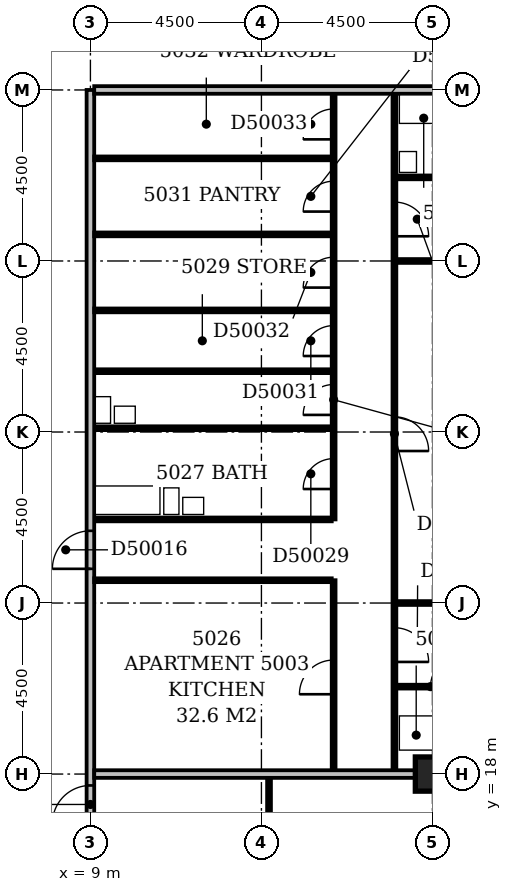
"""IFC4 building model, lengths in metres.
Left out: names, types, materials, properties, quantities, classifications, styles, units other than length and angle.
Written with IfcOpenShell. Run it as: python <this file> out.ifc"""

import sys

from ifc_helpers import new_model, si_unit, direction, frame, frame_2d, origin, origin_2d, place, context, subcontext, project, spatial, rectangle, extrude, element, fill, save


model = new_model("IFC4")
c1 = context("Model", 3, precision=1e-05, world=origin(), true_north=direction((0.0, 1.0)))
c2 = subcontext(c1, "Body", "Model", "MODEL_VIEW")
j1 = project(units=[si_unit("LENGTHUNIT", "METRE"), si_unit("PLANEANGLEUNIT", "RADIAN")], contexts=[c1])
p1 = place(None, origin())
s1 = spatial("IfcSite", under=j1, at=p1, CompositionType="ELEMENT")
p2 = place(p1, origin())
s2 = spatial("IfcBuilding", under=s1, at=p2, CompositionType="ELEMENT")
p3 = place(p2, frame((0.0, 0.0, 197.0)))
s3 = spatial("IfcBuildingStorey", under=s2, at=p3, CompositionType="ELEMENT", Elevation=197.0)
p4 = place(p3, frame((18.0, 18.0, -0.3), z_axis=(0.0, 0.0, 1.0), x_axis=(1.0, 0.0, 0.0)))
e1 = element("IfcColumn", 1, at=p4, inside=s3, PredefinedType="COLUMN", context=c2, shape_type="SweptSolid", body=[
    extrude(rectangle(XDim=0.9, YDim=0.9, at=origin_2d()), origin(), (0.0, 0.0, 1.0), 3.6),
])
p5 = place(p3, frame((9.0, 5.0, 0.0), z_axis=(0.0, 0.0, 1.0), x_axis=(0.0, 1.0, 0.0)))
e2 = element("IfcWall", 2, at=p5, inside=s3, PredefinedType="PARTITIONING", context=c2, shape_type="SweptSolid", body=[
    extrude(rectangle(XDim=31.0, YDim=0.2, at=frame_2d((15.5, 0.0))), origin(), (0.0, 0.0, 1.0), 3.3),
])
p6 = place(p5, frame((18.4, 0.0, 0.0)))
e3 = element("IfcOpeningElement", 3, at=p6, cuts=e2, PredefinedType="OPENING", context=c2, shape_type="SweptSolid", body=[
    extrude(rectangle(XDim=1.0, YDim=2.1, at=frame_2d((0.5, 1.05))), frame((0.0, 0.112, 0.0), z_axis=(0.0, -1.0, 0.0), x_axis=(1.0, 0.0, 0.0)), (0.0, 0.0, 1.0), 0.224),
])
p7 = place(p5, frame((11.7, 0.0, 0.0)))
e4 = element("IfcOpeningElement", 4, at=p7, cuts=e2, PredefinedType="OPENING", context=c2, shape_type="SweptSolid", body=[
    extrude(rectangle(XDim=1.0, YDim=2.1, at=frame_2d((0.5, 1.05))), frame((0.0, 0.112, 0.0), z_axis=(0.0, -1.0, 0.0), x_axis=(1.0, 0.0, 0.0)), (0.0, 0.0, 1.0), 0.224),
])
p8 = place(p5, frame((1.5, 0.0, 0.0)))
e5 = element("IfcOpeningElement", 5, at=p8, cuts=e2, PredefinedType="OPENING", context=c2, shape_type="SweptSolid", body=[
    extrude(rectangle(XDim=0.9, YDim=2.1, at=frame_2d((0.45, 1.05))), frame((0.0, 0.112, 0.0), z_axis=(0.0, -1.0, 0.0), x_axis=(1.0, 0.0, 0.0)), (0.0, 0.0, 1.0), 0.224),
])
p9 = place(p3, frame((13.7, 9.45, 0.0), z_axis=(0.0, 0.0, 1.0), x_axis=(0.0, 1.0, 0.0)))
e6 = element("IfcWall", 6, at=p9, inside=s3, PredefinedType="PARTITIONING", context=c2, shape_type="SweptSolid", body=[
    extrude(rectangle(XDim=8.45, YDim=0.1, at=frame_2d((4.225, 0.0))), origin(), (0.0, 0.0, 1.0), 3.3),
])
p10 = place(p9, frame((1.35, 0.0, 0.0)))
e7 = element("IfcOpeningElement", 7, at=p10, cuts=e6, PredefinedType="OPENING", context=c2, shape_type="SweptSolid", body=[
    extrude(rectangle(XDim=0.9, YDim=2.1, at=frame_2d((0.45, 1.05))), frame((0.0, 0.062, 0.0), z_axis=(0.0, -1.0, 0.0), x_axis=(1.0, 0.0, 0.0)), (0.0, 0.0, 1.0), 0.124),
])
p11 = place(p9, frame((5.85, 0.0, 0.0)))
e8 = element("IfcOpeningElement", 8, at=p11, cuts=e6, PredefinedType="OPENING", context=c2, shape_type="SweptSolid", body=[
    extrude(rectangle(XDim=0.9, YDim=2.1, at=frame_2d((0.45, 1.05))), frame((0.0, 0.062, 0.0), z_axis=(0.0, -1.0, 0.0), x_axis=(1.0, 0.0, 0.0)), (0.0, 0.0, 1.0), 0.124),
])
p12 = place(p3, frame((9.1, 18.0, 0.0), z_axis=(0.0, 0.0, 1.0), x_axis=(1.0, 0.0, 0.0)))
e9 = element("IfcWall", 9, at=p12, inside=s3, PredefinedType="PARTITIONING", context=c2, shape_type="SweptSolid", body=[
    extrude(rectangle(XDim=8.45, YDim=0.2, at=frame_2d((4.225, 0.0))), origin(), (0.0, 0.0, 1.0), 2.6),
])
p13 = place(p3, frame((15.4, 18.1, 0.0), z_axis=(0.0, 0.0, 1.0), x_axis=(0.0, 1.0, 0.0)))
e10 = element("IfcWall", 10, at=p13, inside=s3, PredefinedType="PARTITIONING", context=c2, shape_type="SweptSolid", body=[
    extrude(rectangle(XDim=5.0, YDim=0.1, at=frame_2d((2.5, 0.0))), origin(), (0.0, 0.0, 1.0), 3.3),
])
p14 = place(p13, frame((2.0, 0.0, 0.0)))
e11 = element("IfcOpeningElement", 11, at=p14, cuts=e10, PredefinedType="OPENING", context=c2, shape_type="SweptSolid", body=[
    extrude(rectangle(XDim=0.9, YDim=2.1, at=frame_2d((0.45, 1.05))), frame((0.0, 0.062, 0.0), z_axis=(0.0, -1.0, 0.0), x_axis=(1.0, 0.0, 0.0)), (0.0, 0.0, 1.0), 0.124),
])
p15 = place(p3, frame((17.0, 18.1, 0.0), z_axis=(0.0, 0.0, 1.0), x_axis=(0.0, 1.0, 0.0)))
e12 = element("IfcWall", 12, at=p15, inside=s3, PredefinedType="PARTITIONING", context=c2, shape_type="SweptSolid", body=[
    extrude(rectangle(XDim=17.8, YDim=0.1, at=frame_2d((8.9, 0.0))), origin(), (0.0, 0.0, 1.0), 3.3),
])
p16 = place(p15, frame((2.85, 0.0, 0.0)))
e13 = element("IfcOpeningElement", 13, at=p16, cuts=e12, PredefinedType="OPENING", context=c2, shape_type="SweptSolid", body=[
    extrude(rectangle(XDim=0.9, YDim=2.1, at=frame_2d((0.45, 1.05))), frame((0.0, 0.062, 0.0), z_axis=(0.0, -1.0, 0.0), x_axis=(1.0, 0.0, 0.0)), (0.0, 0.0, 1.0), 0.124),
])
p17 = place(p15, frame((8.4, 0.0, 0.0)))
e14 = element("IfcOpeningElement", 14, at=p17, cuts=e12, PredefinedType="OPENING", context=c2, shape_type="SweptSolid", body=[
    extrude(rectangle(XDim=0.9, YDim=2.1, at=frame_2d((0.45, 1.05))), frame((0.0, 0.062, 0.0), z_axis=(0.0, -1.0, 0.0), x_axis=(1.0, 0.0, 0.0)), (0.0, 0.0, 1.0), 0.124),
])
p18 = place(p15, frame((14.05, 0.0, 0.0)))
e15 = element("IfcOpeningElement", 15, at=p18, cuts=e12, PredefinedType="OPENING", context=c2, shape_type="SweptSolid", body=[
    extrude(rectangle(XDim=0.9, YDim=2.1, at=frame_2d((0.45, 1.05))), frame((0.0, 0.062, 0.0), z_axis=(0.0, -1.0, 0.0), x_axis=(1.0, 0.0, 0.0)), (0.0, 0.0, 1.0), 0.124),
])
p19 = place(p3, frame((17.05, 20.3, 0.0), z_axis=(0.0, 0.0, 1.0), x_axis=(1.0, 0.0, 0.0)))
e16 = element("IfcWall", 16, at=p19, inside=s3, PredefinedType="PLUMBINGWALL", context=c2, shape_type="SweptSolid", body=[
    extrude(rectangle(XDim=1.8, YDim=0.1, at=frame_2d((0.9, 0.0))), origin(), (0.0, 0.0, 1.0), 3.3),
])
p20 = place(p19, frame((0.9, 0.0, 0.0)))
e17 = element("IfcOpeningElement", 17, at=p20, cuts=e16, PredefinedType="OPENING", context=c2, shape_type="SweptSolid", body=[
    extrude(rectangle(XDim=0.8, YDim=2.1, at=frame_2d((0.4, 1.05))), frame((0.0, 0.062, 0.0), z_axis=(0.0, -1.0, 0.0), x_axis=(1.0, 0.0, 0.0)), (0.0, 0.0, 1.0), 0.124),
])
p21 = place(p3, frame((17.05, 22.5, 0.0), z_axis=(0.0, 0.0, 1.0), x_axis=(1.0, 0.0, 0.0)))
e18 = element("IfcWall", 18, at=p21, inside=s3, PredefinedType="PARTITIONING", context=c2, shape_type="SweptSolid", body=[
    extrude(rectangle(XDim=5.0, YDim=0.1, at=frame_2d((2.5, 0.0))), origin(), (0.0, 0.0, 1.0), 3.3),
])
p22 = place(p3, frame((9.1, 23.1, 0.0), z_axis=(0.0, 0.0, 1.0), x_axis=(1.0, 0.0, 0.0)))
e19 = element("IfcWall", 19, at=p22, inside=s3, PredefinedType="PARTITIONING", context=c2, shape_type="SweptSolid", body=[
    extrude(rectangle(XDim=6.25, YDim=0.1, at=frame_2d((3.125, 0.0))), origin(), (0.0, 0.0, 1.0), 3.3),
])
p23 = place(p3, frame((9.1, 24.7, 0.0), z_axis=(0.0, 0.0, 1.0), x_axis=(1.0, 0.0, 0.0)))
e20 = element("IfcWall", 20, at=p23, inside=s3, PredefinedType="PLUMBINGWALL", context=c2, shape_type="SweptSolid", body=[
    extrude(rectangle(XDim=6.25, YDim=0.1, at=frame_2d((3.125, 0.0))), origin(), (0.0, 0.0, 1.0), 3.3),
])
p24 = place(p3, frame((15.4, 24.7, 0.0), z_axis=(0.0, 0.0, 1.0), x_axis=(0.0, 1.0, 0.0)))
e21 = element("IfcWall", 21, at=p24, inside=s3, PredefinedType="PARTITIONING", context=c2, shape_type="SweptSolid", body=[
    extrude(rectangle(XDim=11.2, YDim=0.1, at=frame_2d((5.6, 0.0))), origin(), (0.0, 0.0, 1.0), 3.3),
])
p25 = place(p24, frame((0.8, 0.0, 0.0)))
e22 = element("IfcOpeningElement", 22, at=p25, cuts=e21, PredefinedType="OPENING", context=c2, shape_type="SweptSolid", body=[
    extrude(rectangle(XDim=0.8, YDim=2.1, at=frame_2d((0.4, 1.05))), frame((0.0, 0.062, 0.0), z_axis=(0.0, -1.0, 0.0), x_axis=(1.0, 0.0, 0.0)), (0.0, 0.0, 1.0), 0.124),
])
p26 = place(p24, frame((8.1, 0.0, 0.0)))
e23 = element("IfcOpeningElement", 23, at=p26, cuts=e21, PredefinedType="OPENING", context=c2, shape_type="SweptSolid", body=[
    extrude(rectangle(XDim=0.8, YDim=2.1, at=frame_2d((0.4, 1.05))), frame((0.0, 0.062, 0.0), z_axis=(0.0, -1.0, 0.0), x_axis=(1.0, 0.0, 0.0)), (0.0, 0.0, 1.0), 0.124),
])
p27 = place(p24, frame((4.3, 0.0, 0.0)))
e24 = element("IfcOpeningElement", 24, at=p27, cuts=e21, PredefinedType="OPENING", context=c2, shape_type="SweptSolid", body=[
    extrude(rectangle(XDim=0.8, YDim=2.1, at=frame_2d((0.4, 1.05))), frame((0.0, 0.062, 0.0), z_axis=(0.0, -1.0, 0.0), x_axis=(1.0, 0.0, 0.0)), (0.0, 0.0, 1.0), 0.124),
])
p28 = place(p24, frame((6.1, 0.0, 0.0)))
e25 = element("IfcOpeningElement", 25, at=p28, cuts=e21, PredefinedType="OPENING", context=c2, shape_type="SweptSolid", body=[
    extrude(rectangle(XDim=0.8, YDim=2.1, at=frame_2d((0.4, 1.05))), frame((0.0, 0.062, 0.0), z_axis=(0.0, -1.0, 0.0), x_axis=(1.0, 0.0, 0.0)), (0.0, 0.0, 1.0), 0.124),
])
p29 = place(p24, frame((10.0, 0.0, 0.0)))
e26 = element("IfcOpeningElement", 26, at=p29, cuts=e21, PredefinedType="OPENING", context=c2, shape_type="SweptSolid", body=[
    extrude(rectangle(XDim=0.8, YDim=2.1, at=frame_2d((0.4, 1.05))), frame((0.0, 0.062, 0.0), z_axis=(0.0, -1.0, 0.0), x_axis=(1.0, 0.0, 0.0)), (0.0, 0.0, 1.0), 0.124),
])
p30 = place(p24, frame((2.75, 0.0, 0.0)))
e27 = element("IfcOpeningElement", 27, at=p30, cuts=e21, PredefinedType="OPENING", context=c2, shape_type="SweptSolid", body=[
    extrude(rectangle(XDim=0.8, YDim=2.1, at=frame_2d((0.4, 1.05))), frame((0.0, 0.062, 0.0), z_axis=(0.0, -1.0, 0.0), x_axis=(1.0, 0.0, 0.0)), (0.0, 0.0, 1.0), 0.124),
])
p31 = place(p3, frame((9.1, 27.1, 0.0), z_axis=(0.0, 0.0, 1.0), x_axis=(1.0, 0.0, 0.0)))
e28 = element("IfcWall", 28, at=p31, inside=s3, PredefinedType="PLUMBINGWALL", context=c2, shape_type="SweptSolid", body=[
    extrude(rectangle(XDim=6.25, YDim=0.1, at=frame_2d((3.125, 0.0))), origin(), (0.0, 0.0, 1.0), 2.7),
])
p32 = place(p3, frame((9.1, 28.6, 0.0), z_axis=(0.0, 0.0, 1.0), x_axis=(1.0, 0.0, 0.0)))
e29 = element("IfcWall", 29, at=p32, inside=s3, PredefinedType="PLUMBINGWALL", context=c2, shape_type="SweptSolid", body=[
    extrude(rectangle(XDim=6.25, YDim=0.1, at=frame_2d((3.125, 0.0))), origin(), (0.0, 0.0, 1.0), 3.3),
])
p33 = place(p3, frame((9.1, 30.2, 0.0), z_axis=(0.0, 0.0, 1.0), x_axis=(1.0, 0.0, 0.0)))
e30 = element("IfcWall", 30, at=p33, inside=s3, PredefinedType="PARTITIONING", context=c2, shape_type="SweptSolid", body=[
    extrude(rectangle(XDim=6.25, YDim=0.1, at=frame_2d((3.125, 0.0))), origin(), (0.0, 0.0, 1.0), 3.3),
])
p34 = place(p3, frame((17.05, 31.5, 0.0), z_axis=(0.0, 0.0, 1.0), x_axis=(1.0, 0.0, 0.0)))
e31 = element("IfcWall", 31, at=p34, inside=s3, PredefinedType="PARTITIONING", context=c2, shape_type="SweptSolid", body=[
    extrude(rectangle(XDim=5.0, YDim=0.1, at=frame_2d((2.5, 0.0))), origin(), (0.0, 0.0, 1.0), 3.3),
])
p35 = place(p3, frame((9.1, 32.2, 0.0), z_axis=(0.0, 0.0, 1.0), x_axis=(1.0, 0.0, 0.0)))
e32 = element("IfcWall", 32, at=p35, inside=s3, PredefinedType="PARTITIONING", context=c2, shape_type="SweptSolid", body=[
    extrude(rectangle(XDim=6.25, YDim=0.1, at=frame_2d((3.125, 0.0))), origin(), (0.0, 0.0, 1.0), 3.3),
])
p36 = place(p3, frame((17.05, 33.7, 0.0), z_axis=(0.0, 0.0, 1.0), x_axis=(1.0, 0.0, 0.0)))
e33 = element("IfcWall", 33, at=p36, inside=s3, PredefinedType="PLUMBINGWALL", context=c2, shape_type="SweptSolid", body=[
    extrude(rectangle(XDim=2.8, YDim=0.1, at=frame_2d((1.4, 0.0))), origin(), (0.0, 0.0, 1.0), 3.3),
])
p37 = place(p36, frame((1.0, 0.0, 0.0)))
e34 = element("IfcOpeningElement", 34, at=p37, cuts=e33, PredefinedType="OPENING", context=c2, shape_type="SweptSolid", body=[
    extrude(rectangle(XDim=0.8, YDim=2.1, at=frame_2d((0.4, 1.05))), frame((0.0, 0.062, 0.0), z_axis=(0.0, -1.0, 0.0), x_axis=(1.0, 0.0, 0.0)), (0.0, 0.0, 1.0), 0.124),
])
p38 = place(p3, frame((9.1, 34.2, 0.0), z_axis=(0.0, 0.0, 1.0), x_axis=(1.0, 0.0, 0.0)))
e35 = element("IfcWall", 35, at=p38, inside=s3, PredefinedType="PARTITIONING", context=c2, shape_type="SweptSolid", body=[
    extrude(rectangle(XDim=6.25, YDim=0.1, at=frame_2d((3.125, 0.0))), origin(), (0.0, 0.0, 1.0), 3.3),
])
p39 = place(p3, frame((9.1, 36.0, 0.0), z_axis=(0.0, 0.0, 1.0), x_axis=(1.0, 0.0, 0.0)))
e36 = element("IfcWall", 36, at=p39, inside=s3, PredefinedType="PARTITIONING", context=c2, shape_type="SweptSolid", body=[
    extrude(rectangle(XDim=12.95, YDim=0.2, at=frame_2d((6.475, 0.0))), origin(), (0.0, 0.0, 1.0), 3.3),
])
p40 = place(p6, origin())
e37 = element("IfcDoor", 37, at=p40, inside=s3, OperationType="SINGLE_SWING_LEFT", PredefinedType="DOOR", context=c2, shape_type="SweptSolid", body=[
    extrude(rectangle(XDim=1.0, YDim=2.1, at=frame_2d((0.5, 1.05))), frame((0.0, 0.025, 0.0), z_axis=(0.0, -1.0, 0.0), x_axis=(1.0, 0.0, 0.0)), (0.0, 0.0, 1.0), 0.05),
])
fill(e3, e37)
p41 = place(p7, origin())
e38 = element("IfcDoor", 38, at=p41, inside=s3, OperationType="SINGLE_SWING_LEFT", PredefinedType="DOOR", context=c2, shape_type="SweptSolid", body=[
    extrude(rectangle(XDim=1.0, YDim=2.1, at=frame_2d((0.5, 1.05))), frame((0.0, 0.025, 0.0), z_axis=(0.0, -1.0, 0.0), x_axis=(1.0, 0.0, 0.0)), (0.0, 0.0, 1.0), 0.05),
])
fill(e4, e38)
p42 = place(p14, origin())
e39 = element("IfcDoor", 39, at=p42, inside=s3, OperationType="SINGLE_SWING_LEFT", PredefinedType="DOOR", context=c2, shape_type="SweptSolid", body=[
    extrude(rectangle(XDim=0.9, YDim=2.1, at=frame_2d((0.45, 1.05))), frame((0.0, 0.025, 0.0), z_axis=(0.0, -1.0, 0.0), x_axis=(1.0, 0.0, 0.0)), (0.0, 0.0, 1.0), 0.05),
])
fill(e11, e39)
p43 = place(p16, frame((0.9, 0.0, 0.0), z_axis=(0.0, 0.0, 1.0), x_axis=(-1.0, 0.0, 0.0)))
e40 = element("IfcDoor", 40, at=p43, inside=s3, OperationType="SINGLE_SWING_RIGHT", PredefinedType="DOOR", context=c2, shape_type="SweptSolid", body=[
    extrude(rectangle(XDim=0.9, YDim=2.1, at=frame_2d((0.45, 1.05))), frame((0.0, 0.025, 0.0), z_axis=(0.0, -1.0, 0.0), x_axis=(1.0, 0.0, 0.0)), (0.0, 0.0, 1.0), 0.05),
])
fill(e13, e40)
p44 = place(p17, frame((0.9, 0.0, 0.0), z_axis=(0.0, 0.0, 1.0), x_axis=(-1.0, 0.0, 0.0)))
e41 = element("IfcDoor", 41, at=p44, inside=s3, OperationType="SINGLE_SWING_RIGHT", PredefinedType="DOOR", context=c2, shape_type="SweptSolid", body=[
    extrude(rectangle(XDim=0.9, YDim=2.1, at=frame_2d((0.45, 1.05))), frame((0.0, 0.025, 0.0), z_axis=(0.0, -1.0, 0.0), x_axis=(1.0, 0.0, 0.0)), (0.0, 0.0, 1.0), 0.05),
])
fill(e14, e41)
p45 = place(p18, frame((0.9, 0.0, 0.0), z_axis=(0.0, 0.0, 1.0), x_axis=(-1.0, 0.0, 0.0)))
e42 = element("IfcDoor", 42, at=p45, inside=s3, OperationType="SINGLE_SWING_RIGHT", PredefinedType="DOOR", context=c2, shape_type="SweptSolid", body=[
    extrude(rectangle(XDim=0.9, YDim=2.1, at=frame_2d((0.45, 1.05))), frame((0.0, 0.025, 0.0), z_axis=(0.0, -1.0, 0.0), x_axis=(1.0, 0.0, 0.0)), (0.0, 0.0, 1.0), 0.05),
])
fill(e15, e42)
p46 = place(p20, frame((0.8, 0.0, 0.0), z_axis=(0.0, 0.0, 1.0), x_axis=(-1.0, 0.0, 0.0)))
e43 = element("IfcDoor", 43, at=p46, inside=s3, OperationType="SINGLE_SWING_LEFT", PredefinedType="DOOR", context=c2, shape_type="SweptSolid", body=[
    extrude(rectangle(XDim=0.8, YDim=2.1, at=frame_2d((0.4, 1.05))), frame((0.0, 0.025, 0.0), z_axis=(0.0, -1.0, 0.0), x_axis=(1.0, 0.0, 0.0)), (0.0, 0.0, 1.0), 0.05),
])
fill(e17, e43)
p47 = place(p25, origin())
e44 = element("IfcDoor", 44, at=p47, inside=s3, OperationType="SINGLE_SWING_LEFT", PredefinedType="DOOR", context=c2, shape_type="SweptSolid", body=[
    extrude(rectangle(XDim=0.8, YDim=2.1, at=frame_2d((0.4, 1.05))), frame((0.0, 0.025, 0.0), z_axis=(0.0, -1.0, 0.0), x_axis=(1.0, 0.0, 0.0)), (0.0, 0.0, 1.0), 0.05),
])
fill(e22, e44)
p48 = place(p26, origin())
e45 = element("IfcDoor", 45, at=p48, inside=s3, OperationType="SINGLE_SWING_LEFT", PredefinedType="DOOR", context=c2, shape_type="SweptSolid", body=[
    extrude(rectangle(XDim=0.8, YDim=2.1, at=frame_2d((0.4, 1.05))), frame((0.0, 0.025, 0.0), z_axis=(0.0, -1.0, 0.0), x_axis=(1.0, 0.0, 0.0)), (0.0, 0.0, 1.0), 0.05),
])
fill(e23, e45)
p49 = place(p27, origin())
e46 = element("IfcDoor", 46, at=p49, inside=s3, OperationType="SINGLE_SWING_LEFT", PredefinedType="DOOR", context=c2, shape_type="SweptSolid", body=[
    extrude(rectangle(XDim=0.8, YDim=2.1, at=frame_2d((0.4, 1.05))), frame((0.0, 0.025, 0.0), z_axis=(0.0, -1.0, 0.0), x_axis=(1.0, 0.0, 0.0)), (0.0, 0.0, 1.0), 0.05),
])
fill(e24, e46)
p50 = place(p28, origin())
e47 = element("IfcDoor", 47, at=p50, inside=s3, OperationType="SINGLE_SWING_LEFT", PredefinedType="DOOR", context=c2, shape_type="SweptSolid", body=[
    extrude(rectangle(XDim=0.8, YDim=2.1, at=frame_2d((0.4, 1.05))), frame((0.0, 0.025, 0.0), z_axis=(0.0, -1.0, 0.0), x_axis=(1.0, 0.0, 0.0)), (0.0, 0.0, 1.0), 0.05),
])
fill(e25, e47)
p51 = place(p29, origin())
e48 = element("IfcDoor", 48, at=p51, inside=s3, OperationType="SINGLE_SWING_LEFT", PredefinedType="DOOR", context=c2, shape_type="SweptSolid", body=[
    extrude(rectangle(XDim=0.8, YDim=2.1, at=frame_2d((0.4, 1.05))), frame((0.0, 0.025, 0.0), z_axis=(0.0, -1.0, 0.0), x_axis=(1.0, 0.0, 0.0)), (0.0, 0.0, 1.0), 0.05),
])
fill(e26, e48)
p52 = place(p30, origin())
e49 = element("IfcDoor", 49, at=p52, inside=s3, OperationType="SINGLE_SWING_LEFT", PredefinedType="DOOR", context=c2, shape_type="SweptSolid", body=[
    extrude(rectangle(XDim=0.8, YDim=2.1, at=frame_2d((0.4, 1.05))), frame((0.0, 0.025, 0.0), z_axis=(0.0, -1.0, 0.0), x_axis=(1.0, 0.0, 0.0)), (0.0, 0.0, 1.0), 0.05),
])
fill(e27, e49)
save(model, sys.argv[1])
